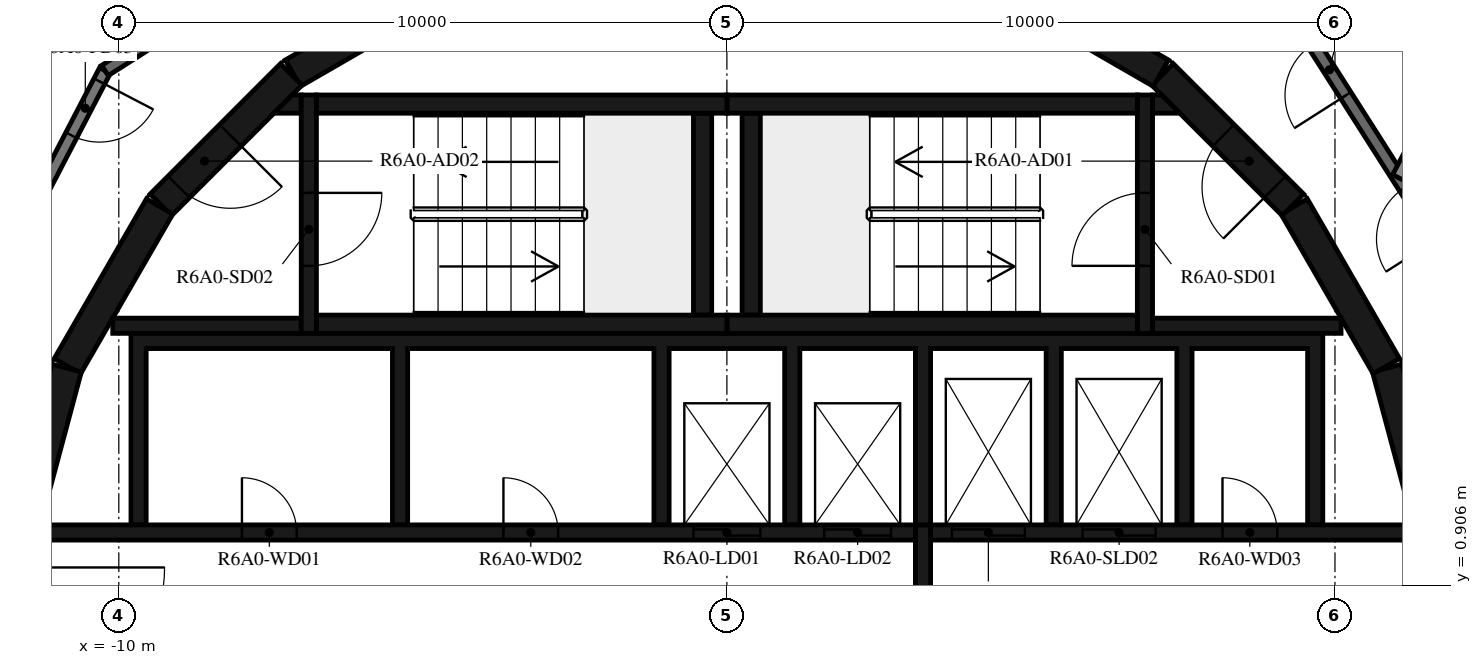
"""IFC4 building model, lengths in metres.
Left out: names, types, materials, properties, quantities, classifications, styles, units other than length and angle.
Written with IfcOpenShell. Run it as: python <this file> out.ifc"""

import sys

from ifc_helpers import new_model, si_unit, direction, frame, frame_2d, origin, place, context, subcontext, project, spatial, polyline, rectangle, outline, extrude, element, fill, save


model = new_model("IFC4")
c1 = context("Model", 3, precision=1e-05, world=origin(), true_north=direction((0.0, 1.0)))
c2 = subcontext(c1, "Body", "Model", "MODEL_VIEW")
j1 = project(units=[si_unit("LENGTHUNIT", "METRE"), si_unit("PLANEANGLEUNIT", "RADIAN")], contexts=[c1])
p1 = place(None, origin())
s1 = spatial("IfcSite", under=j1, at=p1, CompositionType="ELEMENT")
p2 = place(p1, origin())
s2 = spatial("IfcBuilding", under=s1, at=p2, CompositionType="ELEMENT")
p3 = place(p2, frame((0.0, 0.0, 233.7)))
s3 = spatial("IfcBuildingStorey", under=s2, at=p3, CompositionType="ELEMENT", Elevation=233.7)
for number, where, z_axis, x_axis in (
    (1, (11.643, 1.55, 0.0), (0.0, 0.0, 1.0), (-0.259, 0.966, 0.0)),
    (2, (10.845, 4.51, 0.0), (0.0, 0.0, 1.0), (-0.5, 0.866, 0.0)),
):
    element("IfcWall", number, at=place(p3, frame(where, z_axis=z_axis, x_axis=x_axis)), inside=s3, PredefinedType="SHEAR", context=c2, shape_type="SweptSolid", body=[
        extrude(rectangle(XDim=3.033, YDim=0.5, at=frame_2d((1.516, 0.0))), origin(), (0.0, 0.0, 1.0), 3.12),
    ])
p4 = place(p3, frame((9.308, 7.164, 0.0), z_axis=(0.0, 0.0, 1.0), x_axis=(-0.707106781187, 0.707106781187, 0.0)))
e3 = element("IfcWall", 3, at=p4, inside=s3, PredefinedType="SHEAR", context=c2, shape_type="SweptSolid", body=[
    extrude(rectangle(XDim=3.032, YDim=0.5, at=frame_2d((1.516, 0.0))), origin(), (0.0, 0.0, 1.0), 3.12),
])
p5 = place(p4, frame((0.416, 0.0, 0.0)))
e4 = element("IfcOpeningElement", 4, at=p5, cuts=e3, PredefinedType="OPENING", context=c2, shape_type="SweptSolid", body=[
    extrude(rectangle(XDim=1.2, YDim=2.1, at=frame_2d((0.6, 1.05))), frame((0.0, 0.26, 0.0), z_axis=(0.0, -1.0, 0.0), x_axis=(1.0, 0.0, 0.0)), (0.0, 0.0, 1.0), 0.52),
])
for number, where, z_axis, x_axis in (
    (5, (7.137, 9.329, 0.0), (0.0, 0.0, 1.0), (-0.866, 0.5, 0.0)),
    (6, (-4.51, 10.845, 0.0), (0.0, 0.0, 1.0), (-0.866, -0.5, 0.0)),
):
    element("IfcWall", number, at=place(p3, frame(where, z_axis=z_axis, x_axis=x_axis)), inside=s3, PredefinedType="SHEAR", context=c2, shape_type="SweptSolid", body=[
        extrude(rectangle(XDim=3.033, YDim=0.5, at=frame_2d((1.516, 0.0))), origin(), (0.0, 0.0, 1.0), 3.12),
    ])
p6 = place(p3, frame((-7.164, 9.308, 0.0), z_axis=(0.0, 0.0, 1.0), x_axis=(-0.707106781187, -0.707106781187, 0.0)))
e7 = element("IfcWall", 7, at=p6, inside=s3, PredefinedType="SHEAR", context=c2, shape_type="SweptSolid", body=[
    extrude(rectangle(XDim=3.032, YDim=0.5, at=frame_2d((1.516, 0.0))), origin(), (0.0, 0.0, 1.0), 3.12),
])
p7 = place(p6, frame((1.416, 0.0, 0.0)))
e8 = element("IfcOpeningElement", 8, at=p7, cuts=e7, PredefinedType="OPENING", context=c2, shape_type="SweptSolid", body=[
    extrude(rectangle(XDim=1.2, YDim=2.1, at=frame_2d((0.6, 1.05))), frame((0.0, 0.26, 0.0), z_axis=(0.0, -1.0, 0.0), x_axis=(1.0, 0.0, 0.0)), (0.0, 0.0, 1.0), 0.52),
])
for number, where, z_axis, x_axis in (
    (9, (-9.329, 7.137, 0.0), (0.0, 0.0, 1.0), (-0.5, -0.866, 0.0)),
    (10, (-10.858, 4.479, 0.0), (0.0, 0.0, 1.0), (-0.259, -0.966, 0.0)),
):
    element("IfcWall", number, at=place(p3, frame(where, z_axis=z_axis, x_axis=x_axis)), inside=s3, PredefinedType="SHEAR", context=c2, shape_type="SweptSolid", body=[
        extrude(rectangle(XDim=3.033, YDim=0.5, at=frame_2d((1.516, 0.0))), origin(), (0.0, 0.0, 1.0), 3.12),
    ])
for number, where, z_axis, x_axis in (
    (11, (0.0, 5.2, 0.0), (0.0, 0.0, 1.0), (1.0, 0.0, 0.0)),
    (12, (0.0, 8.82, 0.0), (0.0, 0.0, 1.0), (1.0, 0.0, 0.0)),
):
    element("IfcWall", number, at=place(p3, frame(where, z_axis=z_axis, x_axis=x_axis)), inside=s3, PredefinedType="SHEAR", context=c2, shape_type="SweptSolid", body=[
        extrude(rectangle(XDim=6.75, YDim=0.3, at=frame_2d((3.375, 0.0))), origin(), (0.0, 0.0, 1.0), 3.12),
    ])
p8 = place(p3, frame((0.4, 5.35, 0.0), z_axis=(0.0, 0.0, 1.0), x_axis=(0.0, 1.0, 0.0)))
e13 = element("IfcWall", 13, at=p8, inside=s3, PredefinedType="SHEAR", context=c2, shape_type="SweptSolid", body=[
    extrude(rectangle(XDim=3.32, YDim=0.3, at=frame_2d((1.66, 0.0))), origin(), (0.0, 0.0, 1.0), 3.12),
])
p9 = place(p3, frame((6.875, 5.05, 0.0), z_axis=(0.0, 0.0, 1.0), x_axis=(0.0, 1.0, 0.0)))
e14 = element("IfcWall", 14, at=p9, inside=s3, PredefinedType="SHEAR", context=c2, shape_type="SweptSolid", body=[
    extrude(rectangle(XDim=3.92, YDim=0.25, at=frame_2d((1.96, 0.0))), origin(), (0.0, 0.0, 1.0), 3.12),
])
p10 = place(p9, frame((1.11, 0.0, 0.0)))
e15 = element("IfcOpeningElement", 15, at=p10, cuts=e14, PredefinedType="OPENING", context=c2, shape_type="SweptSolid", body=[
    extrude(rectangle(XDim=1.2, YDim=2.1, at=frame_2d((0.6, 1.05))), frame((0.0, 0.135, 0.0), z_axis=(0.0, -1.0, 0.0), x_axis=(1.0, 0.0, 0.0)), (0.0, 0.0, 1.0), 0.27),
])
p11 = place(p3, frame((7.0, 5.175, 0.0), z_axis=(0.0, 0.0, 1.0), x_axis=(1.0, 0.0, 0.0)))
e16 = element("IfcWall", 16, at=p11, inside=s3, PredefinedType="SHEAR", context=c2, shape_type="SweptSolid", body=[
    extrude(rectangle(XDim=3.1, YDim=0.25, at=frame_2d((1.55, 0.0))), origin(), (0.0, 0.0, 1.0), 3.12),
])
p12 = place(p3, origin())
e17 = element("IfcWall", 17, at=p12, inside=s3, PredefinedType="SHEAR", context=c2, shape_type="SweptSolid", body=[
    extrude(outline(polyline([(7.448, 8.67), (7.0, 8.67), (7.0, 8.97), (7.148, 8.97), (7.448, 8.67)])), origin(), (0.0, 0.0, 1.0), 3.12),
])
for number, where, z_axis, x_axis in (
    (18, (-6.75, 5.2, 0.0), (0.0, 0.0, 1.0), (1.0, 0.0, 0.0)),
    (19, (-6.75, 8.82, 0.0), (0.0, 0.0, 1.0), (1.0, 0.0, 0.0)),
):
    element("IfcWall", number, at=place(p3, frame(where, z_axis=z_axis, x_axis=x_axis)), inside=s3, PredefinedType="SHEAR", context=c2, shape_type="SweptSolid", body=[
        extrude(rectangle(XDim=6.75, YDim=0.3, at=frame_2d((3.375, 0.0))), origin(), (0.0, 0.0, 1.0), 3.12),
    ])
p13 = place(p3, frame((-0.4, 5.35, 0.0), z_axis=(0.0, 0.0, 1.0), x_axis=(0.0, 1.0, 0.0)))
e20 = element("IfcWall", 20, at=p13, inside=s3, PredefinedType="SHEAR", context=c2, shape_type="SweptSolid", body=[
    extrude(rectangle(XDim=3.32, YDim=0.3, at=frame_2d((1.66, 0.0))), origin(), (0.0, 0.0, 1.0), 3.12),
])
p14 = place(p3, frame((-6.875, 8.97, 0.0), z_axis=(0.0, 0.0, 1.0), x_axis=(0.0, -1.0, 0.0)))
e21 = element("IfcWall", 21, at=p14, inside=s3, PredefinedType="SHEAR", context=c2, shape_type="SweptSolid", body=[
    extrude(rectangle(XDim=3.92, YDim=0.25, at=frame_2d((1.96, 0.0))), origin(), (0.0, 0.0, 1.0), 3.12),
])
p15 = place(p14, frame((1.61, 0.0, 0.0)))
e22 = element("IfcOpeningElement", 22, at=p15, cuts=e21, PredefinedType="OPENING", context=c2, shape_type="SweptSolid", body=[
    extrude(rectangle(XDim=1.2, YDim=2.1, at=frame_2d((0.6, 1.05))), frame((0.0, 0.135, 0.0), z_axis=(0.0, -1.0, 0.0), x_axis=(1.0, 0.0, 0.0)), (0.0, 0.0, 1.0), 0.27),
])
p16 = place(p3, frame((-7.0, 5.175, 0.0), z_axis=(0.0, 0.0, 1.0), x_axis=(-1.0, 0.0, 0.0)))
e23 = element("IfcWall", 23, at=p16, inside=s3, PredefinedType="SHEAR", context=c2, shape_type="SweptSolid", body=[
    extrude(rectangle(XDim=3.1, YDim=0.25, at=frame_2d((1.55, 0.0))), origin(), (0.0, 0.0, 1.0), 3.12),
])
p17 = place(p3, origin())
e24 = element("IfcWall", 24, at=p17, inside=s3, PredefinedType="SHEAR", context=c2, shape_type="SweptSolid", body=[
    extrude(outline(polyline([(-7.148, 8.97), (-7.0, 8.97), (-7.0, 8.67), (-7.448, 8.67), (-7.148, 8.97)])), origin(), (0.0, 0.0, 1.0), 3.12),
])
p18 = place(p3, origin())
e25 = element("IfcWall", 25, at=p18, inside=s3, PredefinedType="SHEAR", context=c2, shape_type="SweptSolid", body=[
    extrude(outline(polyline([(-9.55, 4.8), (-5.5, 4.8), (-5.5, 1.9), (-5.25, 1.9), (-5.25, 4.8), (-1.2, 4.8), (-1.2, 1.9), (-0.95, 1.9), (-0.95, 4.8), (0.95, 4.8), (0.95, 1.9), (1.2, 1.9), (1.2, 4.8), (3.1, 4.8), (3.1, 1.9), (3.35, 1.9), (3.35, 4.8), (5.25, 4.8), (5.25, 1.9), (5.5, 1.9), (5.5, 4.8), (7.4, 4.8), (7.4, 1.9), (7.65, 1.9), (7.65, 4.8), (9.55, 4.8), (9.55, 1.9), (9.8, 1.9), (9.8, 4.8), (9.8, 5.05), (-9.8, 5.05), (-9.8, 4.8), (-9.8, 1.9), (-9.55, 1.9), (-9.55, 4.8)])), origin(), (0.0, 0.0, 1.0), 3.12),
])
p19 = place(p3, frame((-11.28, 1.775, 0.0), z_axis=(0.0, 0.0, 1.0), x_axis=(1.0, 0.0, 0.0)))
e26 = element("IfcWall", 26, at=p19, inside=s3, PredefinedType="SHEAR", context=c2, shape_type="SweptSolid", body=[
    extrude(rectangle(XDim=14.38, YDim=0.25, at=frame_2d((7.19, 0.0))), origin(), (0.0, 0.0, 1.0), 3.12),
])
p20 = place(p19, frame((10.73, 0.0, 0.0)))
e27 = element("IfcOpeningElement", 27, at=p20, cuts=e26, PredefinedType="OPENING", context=c2, shape_type="SweptSolid", body=[
    extrude(rectangle(XDim=1.1, YDim=2.1, at=frame_2d((0.55, 1.05))), frame((0.0, 0.135, 0.0), z_axis=(0.0, -1.0, 0.0), x_axis=(1.0, 0.0, 0.0)), (0.0, 0.0, 1.0), 0.27),
])
p21 = place(p19, frame((12.88, 0.0, 0.0)))
e28 = element("IfcOpeningElement", 28, at=p21, cuts=e26, PredefinedType="OPENING", context=c2, shape_type="SweptSolid", body=[
    extrude(rectangle(XDim=1.1, YDim=2.1, at=frame_2d((0.55, 1.05))), frame((0.0, 0.135, 0.0), z_axis=(0.0, -1.0, 0.0), x_axis=(1.0, 0.0, 0.0)), (0.0, 0.0, 1.0), 0.27),
])
p22 = place(p19, frame((3.305, 0.0, 0.0)))
e29 = element("IfcOpeningElement", 29, at=p22, cuts=e26, PredefinedType="OPENING", context=c2, shape_type="SweptSolid", body=[
    extrude(rectangle(XDim=0.9, YDim=2.1, at=frame_2d((0.45, 1.05))), frame((0.0, 0.135, 0.0), z_axis=(0.0, -1.0, 0.0), x_axis=(1.0, 0.0, 0.0)), (0.0, 0.0, 1.0), 0.27),
])
p23 = place(p19, frame((7.605, 0.0, 0.0)))
e30 = element("IfcOpeningElement", 30, at=p23, cuts=e26, PredefinedType="OPENING", context=c2, shape_type="SweptSolid", body=[
    extrude(rectangle(XDim=0.9, YDim=2.1, at=frame_2d((0.45, 1.05))), frame((0.0, 0.135, 0.0), z_axis=(0.0, -1.0, 0.0), x_axis=(1.0, 0.0, 0.0)), (0.0, 0.0, 1.0), 0.27),
])
p24 = place(p3, frame((3.35, 1.775, 0.0), z_axis=(0.0, 0.0, 1.0), x_axis=(1.0, 0.0, 0.0)))
e31 = element("IfcWall", 31, at=p24, inside=s3, PredefinedType="SHEAR", context=c2, shape_type="SweptSolid", body=[
    extrude(rectangle(XDim=7.93, YDim=0.25, at=frame_2d((3.965, 0.0))), origin(), (0.0, 0.0, 1.0), 3.12),
])
p25 = place(p24, frame((0.35, 0.0, 0.0)))
e32 = element("IfcOpeningElement", 32, at=p25, cuts=e31, PredefinedType="OPENING", context=c2, shape_type="SweptSolid", body=[
    extrude(rectangle(XDim=1.2, YDim=2.4, at=frame_2d((0.6, 1.2))), frame((0.0, 0.135, 0.0), z_axis=(0.0, -1.0, 0.0), x_axis=(1.0, 0.0, 0.0)), (0.0, 0.0, 1.0), 0.27),
])
p26 = place(p24, frame((2.5, 0.0, 0.0)))
e33 = element("IfcOpeningElement", 33, at=p26, cuts=e31, PredefinedType="OPENING", context=c2, shape_type="SweptSolid", body=[
    extrude(rectangle(XDim=1.2, YDim=2.4, at=frame_2d((0.6, 1.2))), frame((0.0, 0.135, 0.0), z_axis=(0.0, -1.0, 0.0), x_axis=(1.0, 0.0, 0.0)), (0.0, 0.0, 1.0), 0.27),
])
p27 = place(p24, frame((4.8, 0.0, 0.0)))
e34 = element("IfcOpeningElement", 34, at=p27, cuts=e31, PredefinedType="OPENING", context=c2, shape_type="SweptSolid", body=[
    extrude(rectangle(XDim=0.9, YDim=2.1, at=frame_2d((0.45, 1.05))), frame((0.0, 0.135, 0.0), z_axis=(0.0, -1.0, 0.0), x_axis=(1.0, 0.0, 0.0)), (0.0, 0.0, 1.0), 0.27),
])
p28 = place(p3, frame((3.225, -1.9, 0.0), z_axis=(0.0, 0.0, 1.0), x_axis=(0.0, 1.0, 0.0)))
e35 = element("IfcWall", 35, at=p28, inside=s3, PredefinedType="SHEAR", context=c2, shape_type="SweptSolid", body=[
    extrude(rectangle(XDim=3.8, YDim=0.25, at=frame_2d((1.9, 0.0))), origin(), (0.0, 0.0, 1.0), 3.12),
])
p29 = place(p3, frame((13.231, 4.172, 0.0), z_axis=(0.0, 0.0, 1.0), x_axis=(-0.537304397561, 0.843388394728, 0.0)))
e36 = element("IfcWall", 36, at=p29, inside=s3, PredefinedType="STANDARD", context=c2, shape_type="SweptSolid", body=[
    extrude(rectangle(XDim=7.181, YDim=0.2, at=frame_2d((3.59, 0.0))), origin(), (0.0, 0.0, 1.0), 3.12),
])
p30 = place(p29, frame((2.881, 0.0, 0.0)))
e37 = element("IfcOpeningElement", 37, at=p30, cuts=e36, PredefinedType="OPENING", context=c2, shape_type="SweptSolid", body=[
    extrude(rectangle(XDim=1.0, YDim=2.1, at=frame_2d((0.5, 1.05))), frame((0.0, 0.11, 0.0), z_axis=(0.0, -1.0, 0.0), x_axis=(1.0, 0.0, 0.0)), (0.0, 0.0, 1.0), 0.22),
])
p31 = place(p29, frame((5.681, 0.0, 0.0)))
e38 = element("IfcOpeningElement", 38, at=p31, cuts=e36, PredefinedType="OPENING", context=c2, shape_type="SweptSolid", body=[
    extrude(rectangle(XDim=1.0, YDim=2.1, at=frame_2d((0.5, 1.05))), frame((0.0, 0.11, 0.0), z_axis=(0.0, -1.0, 0.0), x_axis=(1.0, 0.0, 0.0)), (0.0, 0.0, 1.0), 0.22),
])
p32 = place(p3, frame((-10.228, 9.372, 0.0), z_axis=(0.0, 0.0, 1.0), x_axis=(-0.461759464021, -0.887005184532, 0.0)))
e39 = element("IfcWall", 39, at=p32, inside=s3, PredefinedType="STANDARD", context=c2, shape_type="SweptSolid", body=[
    extrude(rectangle(XDim=7.181, YDim=0.2, at=frame_2d((3.591, 0.0))), origin(), (0.0, 0.0, 1.0), 3.12),
])
p33 = place(p32, frame((0.2, 0.0, 0.0)))
e40 = element("IfcOpeningElement", 40, at=p33, cuts=e39, PredefinedType="OPENING", context=c2, shape_type="SweptSolid", body=[
    extrude(rectangle(XDim=1.0, YDim=2.1, at=frame_2d((0.5, 1.05))), frame((0.0, 0.11, 0.0), z_axis=(0.0, -1.0, 0.0), x_axis=(1.0, 0.0, 0.0)), (0.0, 0.0, 1.0), 0.22),
])
p34 = place(p3, frame((-4.172, 13.231, 0.0), z_axis=(0.0, 0.0, 1.0), x_axis=(-0.843388394728, -0.537304397561, 0.0)))
e41 = element("IfcWall", 41, at=p34, inside=s3, PredefinedType="STANDARD", context=c2, shape_type="SweptSolid", body=[
    extrude(rectangle(XDim=7.181, YDim=0.2, at=frame_2d((3.59, 0.0))), origin(), (0.0, 0.0, 1.0), 3.12),
])
p35 = place(p3, frame((13.801, 12.922, 0.0), z_axis=(0.0, 0.0, 1.0), x_axis=(-0.461726485624, -0.887022351733, 0.0)))
e42 = element("IfcWall", 42, at=p35, inside=s3, PredefinedType="STANDARD", context=c2, shape_type="SweptSolid", body=[
    extrude(rectangle(XDim=5.984, YDim=0.2, at=frame_2d((2.992, 0.0))), origin(), (0.0, 0.0, 1.0), 2.73),
])
p36 = place(p10, origin())
e43 = element("IfcDoor", 43, at=p36, inside=s3, OperationType="SINGLE_SWING_LEFT", PredefinedType="DOOR", context=c2, shape_type="SweptSolid", body=[
    extrude(rectangle(XDim=1.2, YDim=2.1, at=frame_2d((0.6, 1.05))), frame((0.0, 0.025, 0.0), z_axis=(0.0, -1.0, 0.0), x_axis=(1.0, 0.0, 0.0)), (0.0, 0.0, 1.0), 0.05),
])
fill(e15, e43)
p37 = place(p5, origin())
e44 = element("IfcDoor", 44, at=p37, inside=s3, OperationType="SINGLE_SWING_RIGHT", PredefinedType="DOOR", context=c2, shape_type="SweptSolid", body=[
    extrude(rectangle(XDim=1.2, YDim=2.1, at=frame_2d((0.6, 1.05))), frame((0.0, 0.025, 0.0), z_axis=(0.0, -1.0, 0.0), x_axis=(1.0, 0.0, 0.0)), (0.0, 0.0, 1.0), 0.05),
])
fill(e4, e44)
p38 = place(p15, origin())
e45 = element("IfcDoor", 45, at=p38, inside=s3, OperationType="SINGLE_SWING_LEFT", PredefinedType="DOOR", context=c2, shape_type="SweptSolid", body=[
    extrude(rectangle(XDim=1.2, YDim=2.1, at=frame_2d((0.6, 1.05))), frame((0.0, 0.025, 0.0), z_axis=(0.0, -1.0, 0.0), x_axis=(1.0, 0.0, 0.0)), (0.0, 0.0, 1.0), 0.05),
])
fill(e22, e45)
p39 = place(p7, origin())
e46 = element("IfcDoor", 46, at=p39, inside=s3, OperationType="SINGLE_SWING_RIGHT", PredefinedType="DOOR", context=c2, shape_type="SweptSolid", body=[
    extrude(rectangle(XDim=1.2, YDim=2.1, at=frame_2d((0.6, 1.05))), frame((0.0, 0.025, 0.0), z_axis=(0.0, -1.0, 0.0), x_axis=(1.0, 0.0, 0.0)), (0.0, 0.0, 1.0), 0.05),
])
fill(e8, e46)
p40 = place(p20, origin())
e47 = element("IfcDoor", 47, at=p40, inside=s3, OperationType="DOUBLE_DOOR_SLIDING", PredefinedType="DOOR", context=c2, shape_type="SweptSolid", body=[
    extrude(rectangle(XDim=1.1, YDim=2.1, at=frame_2d((0.55, 1.05))), frame((0.0, 0.025, 0.0), z_axis=(0.0, -1.0, 0.0), x_axis=(1.0, 0.0, 0.0)), (0.0, 0.0, 1.0), 0.05),
])
fill(e27, e47)
p41 = place(p21, origin())
e48 = element("IfcDoor", 48, at=p41, inside=s3, OperationType="DOUBLE_DOOR_SLIDING", PredefinedType="DOOR", context=c2, shape_type="SweptSolid", body=[
    extrude(rectangle(XDim=1.1, YDim=2.1, at=frame_2d((0.55, 1.05))), frame((0.0, 0.025, 0.0), z_axis=(0.0, -1.0, 0.0), x_axis=(1.0, 0.0, 0.0)), (0.0, 0.0, 1.0), 0.05),
])
fill(e28, e48)
p42 = place(p25, origin())
e49 = element("IfcDoor", 49, at=p42, inside=s3, OperationType="DOUBLE_DOOR_SLIDING", PredefinedType="DOOR", context=c2, shape_type="SweptSolid", body=[
    extrude(rectangle(XDim=1.2, YDim=2.4, at=frame_2d((0.6, 1.2))), frame((0.0, 0.025, 0.0), z_axis=(0.0, -1.0, 0.0), x_axis=(1.0, 0.0, 0.0)), (0.0, 0.0, 1.0), 0.05),
])
fill(e32, e49)
p43 = place(p26, origin())
e50 = element("IfcDoor", 50, at=p43, inside=s3, OperationType="DOUBLE_DOOR_SLIDING", PredefinedType="DOOR", context=c2, shape_type="SweptSolid", body=[
    extrude(rectangle(XDim=1.2, YDim=2.4, at=frame_2d((0.6, 1.2))), frame((0.0, 0.025, 0.0), z_axis=(0.0, -1.0, 0.0), x_axis=(1.0, 0.0, 0.0)), (0.0, 0.0, 1.0), 0.05),
])
fill(e33, e50)
p44 = place(p22, origin())
e51 = element("IfcDoor", 51, at=p44, inside=s3, OperationType="SINGLE_SWING_LEFT", PredefinedType="DOOR", context=c2, shape_type="SweptSolid", body=[
    extrude(rectangle(XDim=0.9, YDim=2.1, at=frame_2d((0.45, 1.05))), frame((0.0, 0.025, 0.0), z_axis=(0.0, -1.0, 0.0), x_axis=(1.0, 0.0, 0.0)), (0.0, 0.0, 1.0), 0.05),
])
fill(e29, e51)
p45 = place(p23, origin())
e52 = element("IfcDoor", 52, at=p45, inside=s3, OperationType="SINGLE_SWING_RIGHT", PredefinedType="DOOR", context=c2, shape_type="SweptSolid", body=[
    extrude(rectangle(XDim=0.9, YDim=2.1, at=frame_2d((0.45, 1.05))), frame((0.0, 0.025, 0.0), z_axis=(0.0, -1.0, 0.0), x_axis=(1.0, 0.0, 0.0)), (0.0, 0.0, 1.0), 0.05),
])
fill(e30, e52)
p46 = place(p27, origin())
e53 = element("IfcDoor", 53, at=p46, inside=s3, OperationType="SINGLE_SWING_LEFT", PredefinedType="DOOR", context=c2, shape_type="SweptSolid", body=[
    extrude(rectangle(XDim=0.9, YDim=2.1, at=frame_2d((0.45, 1.05))), frame((0.0, 0.025, 0.0), z_axis=(0.0, -1.0, 0.0), x_axis=(1.0, 0.0, 0.0)), (0.0, 0.0, 1.0), 0.05),
])
fill(e34, e53)
p47 = place(p31, origin())
e54 = element("IfcDoor", 54, at=p47, inside=s3, OperationType="SINGLE_SWING_LEFT", PredefinedType="DOOR", context=c2, shape_type="SweptSolid", body=[
    extrude(rectangle(XDim=1.0, YDim=2.1, at=frame_2d((0.5, 1.05))), frame((0.0, 0.025, 0.0), z_axis=(0.0, -1.0, 0.0), x_axis=(1.0, 0.0, 0.0)), (0.0, 0.0, 1.0), 0.05),
])
fill(e38, e54)
p48 = place(p33, origin())
e55 = element("IfcDoor", 55, at=p48, inside=s3, OperationType="SINGLE_SWING_LEFT", PredefinedType="DOOR", context=c2, shape_type="SweptSolid", body=[
    extrude(rectangle(XDim=1.0, YDim=2.1, at=frame_2d((0.5, 1.05))), frame((0.0, 0.025, 0.0), z_axis=(0.0, -1.0, 0.0), x_axis=(1.0, 0.0, 0.0)), (0.0, 0.0, 1.0), 0.05),
])
fill(e40, e55)
save(model, sys.argv[1])
